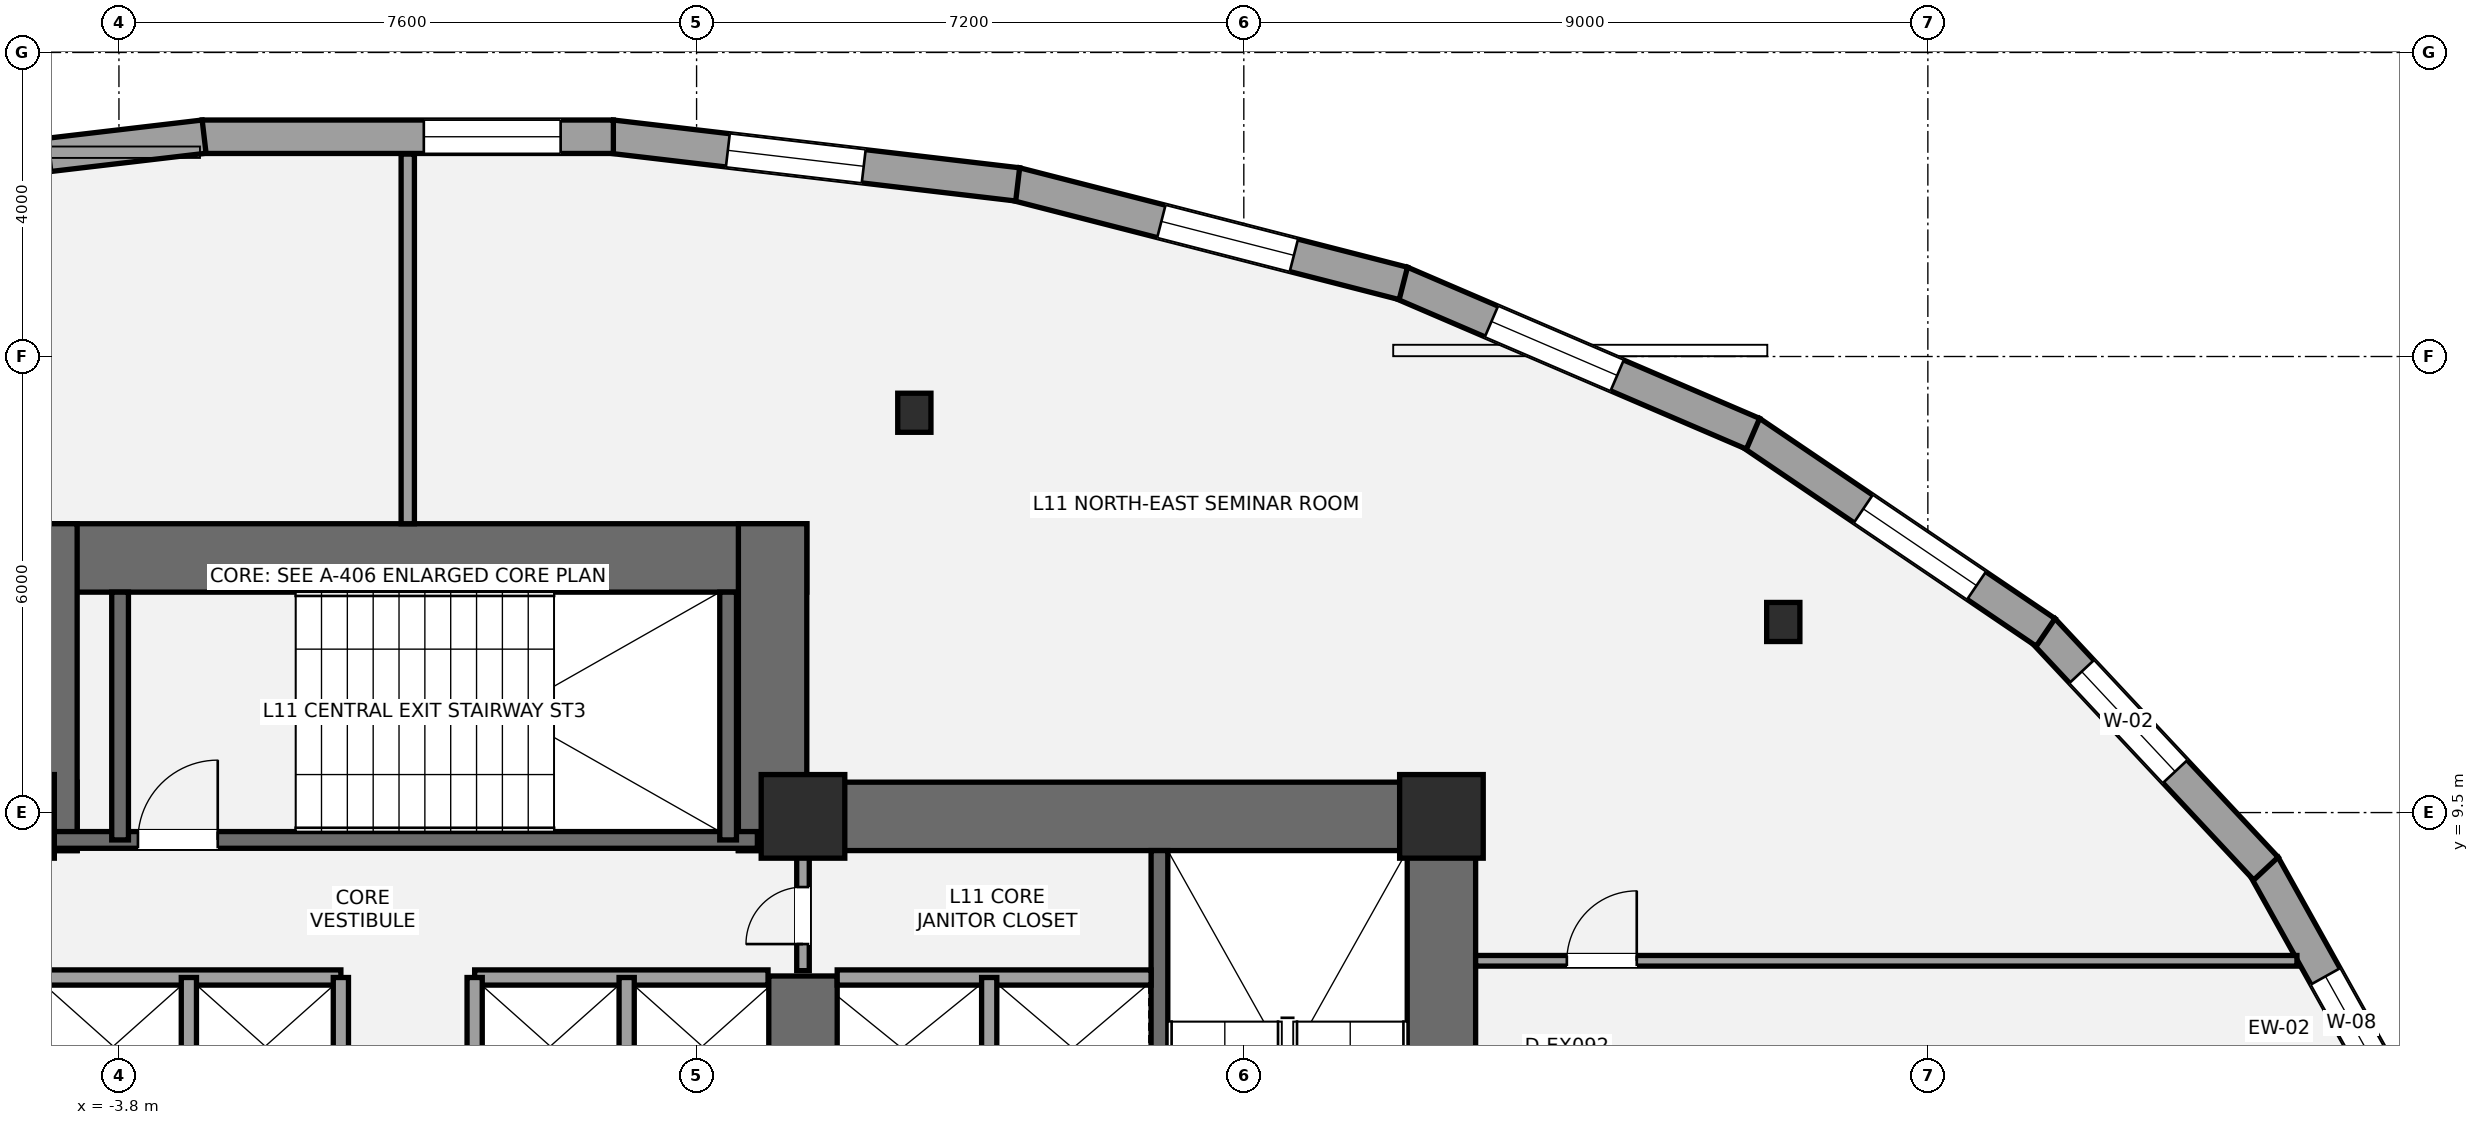
"""IFC4 building model, lengths in metres.
Left out: names, types, materials, properties, quantities, classifications, styles, units other than length and angle.
Written with IfcOpenShell. Run it as: python <this file> out.ifc"""

import sys

from ifc_helpers import new_model, si_unit, direction, frame, frame_2d, origin, origin_2d, place, context, subcontext, project, spatial, rectangle, i_section, extrude, element, fill, save


model = new_model("IFC4")
c1 = context("Model", 3, precision=1e-05, world=origin(), true_north=direction((0.0, 1.0)))
c2 = subcontext(c1, "Body", "Model", "MODEL_VIEW")
j1 = project(units=[si_unit("LENGTHUNIT", "METRE"), si_unit("PLANEANGLEUNIT", "RADIAN")], contexts=[c1])
p1 = place(None, origin())
s1 = spatial("IfcSite", under=j1, at=p1, CompositionType="ELEMENT")
p2 = place(p1, origin())
s2 = spatial("IfcBuilding", under=s1, at=p2, CompositionType="ELEMENT")
p3 = place(p2, frame((0.0, 0.0, 45.0)))
s3 = spatial("IfcBuildingStorey", under=s2, at=p3, CompositionType="ELEMENT", Elevation=45.0)
p4 = place(p3, frame((-14.05, 9.45, 0.0), z_axis=(0.0, 0.0, 1.0), x_axis=(1.0, 0.0, 0.0)))
e1 = element("IfcWall", 1, at=p4, inside=s3, PredefinedType="SHEAR", context=c2, shape_type="SweptSolid", body=[
    extrude(rectangle(XDim=9.7, YDim=0.9, at=frame_2d((4.85, 0.0))), origin(), (0.0, 0.0, 1.0), 3.6),
])
p5 = place(p3, frame((13.6, 0.95, 0.0), z_axis=(0.0, 0.0, 1.0), x_axis=(0.0, 1.0, 0.0)))
e2 = element("IfcWall", 2, at=p5, inside=s3, PredefinedType="SHEAR", context=c2, shape_type="SweptSolid", body=[
    extrude(rectangle(XDim=8.95, YDim=0.9, at=frame_2d((4.475, 0.0))), origin(), (0.0, 0.0, 1.0), 3.6),
])
p6 = place(p3, frame((4.35, 9.45, 0.0), z_axis=(0.0, 0.0, 1.0), x_axis=(1.0, 0.0, 0.0)))
e3 = element("IfcWall", 3, at=p6, inside=s3, PredefinedType="SHEAR", context=c2, shape_type="SweptSolid", body=[
    extrude(rectangle(XDim=9.7, YDim=0.9, at=frame_2d((4.85, 0.0))), origin(), (0.0, 0.0, 1.0), 3.6),
])
p7 = place(p3, frame((5.2, 5.35, 0.0), z_axis=(0.0, 0.0, 1.0), x_axis=(0.0, 1.0, 0.0)))
e4 = element("IfcWall", 4, at=p7, inside=s3, PredefinedType="SHEAR", context=c2, shape_type="SweptSolid", body=[
    extrude(rectangle(XDim=2.0, YDim=0.9, at=frame_2d((1.0, 0.0))), origin(), (0.0, 0.0, 1.0), 3.6),
])
p8 = place(p3, frame((9.89, 1.85, 0.0), z_axis=(0.0, 0.0, 1.0), x_axis=(0.0, 1.0, 0.0)))
e5 = element("IfcWall", 5, at=p8, inside=s3, PredefinedType="SHEAR", context=c2, shape_type="SweptSolid", body=[
    extrude(rectangle(XDim=7.15, YDim=0.22, at=frame_2d((3.575, 0.0))), origin(), (0.0, 0.0, 1.0), 3.6),
])
p9 = place(p3, frame((-5.25, 12.85, 0.0), z_axis=(0.0, 0.0, 1.0), x_axis=(1.0, 0.0, 0.0)))
e6 = element("IfcWall", 6, at=p9, inside=s3, PredefinedType="SHEAR", context=c2, shape_type="SweptSolid", body=[
    extrude(rectangle(XDim=10.5, YDim=0.9, at=frame_2d((5.25, 0.0))), origin(), (0.0, 0.0, 1.0), 3.6),
])
for number, where, z_axis, x_axis in (
    (7, (-4.8, 9.0, 0.0), (0.0, 0.0, 1.0), (0.0, 1.0, 0.0)),
    (8, (4.8, 9.0, 0.0), (0.0, 0.0, 1.0), (0.0, 1.0, 0.0)),
):
    element("IfcWall", number, at=place(p3, frame(where, z_axis=z_axis, x_axis=x_axis)), inside=s3, PredefinedType="SHEAR", context=c2, shape_type="SweptSolid", body=[
        extrude(rectangle(XDim=4.3, YDim=0.9, at=frame_2d((2.15, 0.0))), origin(), (0.0, 0.0, 1.0), 3.6),
    ])
p10 = place(p3, frame((-4.7, 9.14, 0.0), z_axis=(0.0, 0.0, 1.0), x_axis=(1.0, 0.0, 0.0)))
e9 = element("IfcWall", 9, at=p10, inside=s3, PredefinedType="SHEAR", context=c2, shape_type="SweptSolid", body=[
    extrude(rectangle(XDim=9.3, YDim=0.22, at=frame_2d((4.65, 0.0))), origin(), (0.0, 0.0, 1.0), 3.6),
])
p11 = place(p10, frame((1.15, 0.0, 0.0)))
e10 = element("IfcOpeningElement", 10, at=p11, cuts=e9, PredefinedType="OPENING", context=c2, shape_type="SweptSolid", body=[
    extrude(rectangle(XDim=1.05, YDim=2.15, at=frame_2d((0.525, 1.075))), frame((0.0, 0.12, 0.0), z_axis=(0.0, -1.0, 0.0), x_axis=(1.0, 0.0, 0.0)), (0.0, 0.0, 1.0), 0.24),
])
for number, where, z_axis, x_axis in (
    (11, (-3.785, 9.14, 0.0), (0.0, 0.0, 1.0), (0.0, 1.0, 0.0)),
    (12, (4.215, 9.14, 0.0), (0.0, 0.0, 1.0), (0.0, 1.0, 0.0)),
):
    element("IfcWall", number, at=place(p3, frame(where, z_axis=z_axis, x_axis=x_axis)), inside=s3, PredefinedType="SHEAR", context=c2, shape_type="SweptSolid", body=[
        extrude(rectangle(XDim=3.26, YDim=0.22, at=frame_2d((1.63, 0.0))), origin(), (0.0, 0.0, 1.0), 3.6),
    ])
for number, where, z_axis, x_axis in (
    (13, (-5.2, 9.45, 0.0), (0.0, 0.0, 1.0), (1.0, 0.0, 0.0)),
    (14, (5.2, 9.45, 0.0), (0.0, 0.0, 1.0), (1.0, 0.0, 0.0)),
    (15, (13.6, 9.45, 0.0), (0.0, 0.0, 1.0), (1.0, 0.0, 0.0)),
):
    element("IfcColumn", number, at=place(p3, frame(where, z_axis=z_axis, x_axis=x_axis)), inside=s3, PredefinedType="COLUMN", context=c2, shape_type="SweptSolid", body=[
        extrude(rectangle(XDim=1.1, YDim=1.1, at=origin_2d()), origin(), (0.0, 0.0, 1.0), 3.6),
    ])
for number, where, z_axis, x_axis in (
    (16, (18.098, 12.007, 0.0), (0.0, 0.0, 1.0), (1.0, 0.0, 0.0)),
    (17, (6.665, 14.76, 0.0), (0.0, 0.0, 1.0), (1.0, 0.0, 0.0)),
):
    element("IfcColumn", number, at=place(p3, frame(where, z_axis=z_axis, x_axis=x_axis)), inside=s3, PredefinedType="COLUMN", context=c2, shape_type="SweptSolid", body=[
        extrude(i_section(OverallWidth=0.437, OverallDepth=0.514, WebThickness=0.061, FlangeThickness=0.097, at=origin_2d()), origin(), (0.0, 0.0, 1.0), 3.6),
    ])
p12 = place(p3, frame((24.416, 8.806, 0.0), z_axis=(0.0, 0.0, 1.0), x_axis=(0.487369438963, -0.873195871477, 0.0)))
e18 = element("IfcWall", 18, at=p12, inside=s3, PredefinedType="STANDARD", context=c2, shape_type="SweptSolid", body=[
    extrude(rectangle(XDim=3.96, YDim=0.44, at=frame_2d((1.98, 0.0))), origin(), (0.0, 0.0, 1.0), 2.529),
])
p13 = place(p12, frame((1.673, 0.0, 0.58)))
e19 = element("IfcOpeningElement", 19, at=p13, cuts=e18, PredefinedType="OPENING", context=c2, shape_type="SweptSolid", body=[
    extrude(rectangle(XDim=1.4, YDim=1.55, at=frame_2d((0.7, 0.775))), frame((0.0, 0.23, 0.0), z_axis=(0.0, -1.0, 0.0), x_axis=(1.0, 0.0, 0.0)), (0.0, 0.0, 1.0), 0.46),
])
p14 = place(p3, frame((21.512, 11.902, 0.0), z_axis=(0.0, 0.0, 1.0), x_axis=(0.68299392258, -0.730424056093, 0.0)))
e20 = element("IfcWall", 20, at=p14, inside=s3, PredefinedType="STANDARD", context=c2, shape_type="SweptSolid", body=[
    extrude(rectangle(XDim=4.298, YDim=0.44, at=frame_2d((2.149, 0.0))), origin(), (0.0, 0.0, 1.0), 2.529),
])
p15 = place(p14, frame((0.75, 0.0, 0.65)))
e21 = element("IfcOpeningElement", 21, at=p15, cuts=e20, PredefinedType="OPENING", context=c2, shape_type="SweptSolid", body=[
    extrude(rectangle(XDim=1.8, YDim=1.7, at=frame_2d((0.9, 0.85))), frame((0.0, 0.23, 0.0), z_axis=(0.0, -1.0, 0.0), x_axis=(1.0, 0.0, 0.0)), (0.0, 0.0, 1.0), 0.46),
])
p16 = place(p3, frame((17.663, 14.504, 0.0), z_axis=(0.0, 0.0, 1.0), x_axis=(0.827825981515, -0.560984976919, 0.0)))
e22 = element("IfcWall", 22, at=p16, inside=s3, PredefinedType="STANDARD", context=c2, shape_type="SweptSolid", body=[
    extrude(rectangle(XDim=4.695, YDim=0.44, at=frame_2d((2.347, 0.0))), origin(), (0.0, 0.0, 1.0), 2.529),
])
p17 = place(p16, frame((1.796, 0.0, 0.65)))
e23 = element("IfcOpeningElement", 23, at=p17, cuts=e22, PredefinedType="OPENING", context=c2, shape_type="SweptSolid", body=[
    extrude(rectangle(XDim=1.8, YDim=1.7, at=frame_2d((0.9, 0.85))), frame((0.0, 0.23, 0.0), z_axis=(0.0, -1.0, 0.0), x_axis=(1.0, 0.0, 0.0)), (0.0, 0.0, 1.0), 0.46),
])
p18 = place(p3, frame((13.067, 16.473, 0.0), z_axis=(0.0, 0.0, 1.0), x_axis=(0.918881850071, -0.394532819433, 0.0)))
e24 = element("IfcWall", 24, at=p18, inside=s3, PredefinedType="STANDARD", context=c2, shape_type="SweptSolid", body=[
    extrude(rectangle(XDim=5.042, YDim=0.44, at=frame_2d((2.521, 0.0))), origin(), (0.0, 0.0, 1.0), 2.529),
])
p19 = place(p18, frame((1.297, 0.0, 0.65)))
e25 = element("IfcOpeningElement", 25, at=p19, cuts=e24, PredefinedType="OPENING", context=c2, shape_type="SweptSolid", body=[
    extrude(rectangle(XDim=1.8, YDim=1.7, at=frame_2d((0.9, 0.85))), frame((0.0, 0.23, 0.0), z_axis=(0.0, -1.0, 0.0), x_axis=(1.0, 0.0, 0.0)), (0.0, 0.0, 1.0), 0.46),
])
p20 = place(p3, frame((7.996, 17.77, 0.0), z_axis=(0.0, 0.0, 1.0), x_axis=(0.968705592422, -0.248212560542, 0.0)))
e26 = element("IfcWall", 26, at=p20, inside=s3, PredefinedType="STANDARD", context=c2, shape_type="SweptSolid", body=[
    extrude(rectangle(XDim=5.268, YDim=0.44, at=frame_2d((2.634, 0.0))), origin(), (0.0, 0.0, 1.0), 2.529),
])
p21 = place(p20, frame((1.981, 0.0, 0.65)))
e27 = element("IfcOpeningElement", 27, at=p21, cuts=e26, PredefinedType="OPENING", context=c2, shape_type="SweptSolid", body=[
    extrude(rectangle(XDim=1.8, YDim=1.7, at=frame_2d((0.9, 0.85))), frame((0.0, 0.23, 0.0), z_axis=(0.0, -1.0, 0.0), x_axis=(1.0, 0.0, 0.0)), (0.0, 0.0, 1.0), 0.46),
])
p22 = place(p3, frame((2.679, 18.393, 0.0), z_axis=(0.0, 0.0, 1.0), x_axis=(0.993159890371, -0.116762289112, 0.0)))
e28 = element("IfcWall", 28, at=p22, inside=s3, PredefinedType="STANDARD", context=c2, shape_type="SweptSolid", body=[
    extrude(rectangle(XDim=5.382, YDim=0.44, at=frame_2d((2.691, 0.0))), origin(), (0.0, 0.0, 1.0), 2.529),
])
p23 = place(p22, frame((1.542, 0.0, 0.65)))
e29 = element("IfcOpeningElement", 29, at=p23, cuts=e28, PredefinedType="OPENING", context=c2, shape_type="SweptSolid", body=[
    extrude(rectangle(XDim=1.8, YDim=1.7, at=frame_2d((0.9, 0.85))), frame((0.0, 0.23, 0.0), z_axis=(0.0, -1.0, 0.0), x_axis=(1.0, 0.0, 0.0)), (0.0, 0.0, 1.0), 0.46),
])
p24 = place(p3, frame((-2.705, 18.391, 0.0), z_axis=(0.0, 0.0, 1.0), x_axis=(1.0, 0.0, 0.0)))
e30 = element("IfcWall", 30, at=p24, inside=s3, PredefinedType="STANDARD", context=c2, shape_type="SweptSolid", body=[
    extrude(rectangle(XDim=5.41, YDim=0.44, at=frame_2d((2.705, 0.0))), origin(), (0.0, 0.0, 1.0), 2.529),
])
p25 = place(p24, frame((2.917, 0.0, 0.65)))
e31 = element("IfcOpeningElement", 31, at=p25, cuts=e30, PredefinedType="OPENING", context=c2, shape_type="SweptSolid", body=[
    extrude(rectangle(XDim=1.8, YDim=1.7, at=frame_2d((0.9, 0.85))), frame((0.0, 0.23, 0.0), z_axis=(0.0, -1.0, 0.0), x_axis=(1.0, 0.0, 0.0)), (0.0, 0.0, 1.0), 0.46),
])
p26 = place(p3, frame((-8.025, 17.764, 0.0), z_axis=(0.0, 0.0, 1.0), x_axis=(0.993159890371, 0.116762289112, 0.0)))
e32 = element("IfcWall", 32, at=p26, inside=s3, PredefinedType="STANDARD", context=c2, shape_type="SweptSolid", body=[
    extrude(rectangle(XDim=5.382, YDim=0.44, at=frame_2d((2.691, 0.0))), origin(), (0.0, 0.0, 1.0), 2.529),
])
p27 = place(p26, frame((1.542, 0.0, 0.65)))
e33 = element("IfcOpeningElement", 33, at=p27, cuts=e32, PredefinedType="OPENING", context=c2, shape_type="SweptSolid", body=[
    extrude(rectangle(XDim=1.8, YDim=1.7, at=frame_2d((0.9, 0.85))), frame((0.0, 0.23, 0.0), z_axis=(0.0, -1.0, 0.0), x_axis=(1.0, 0.0, 0.0)), (0.0, 0.0, 1.0), 0.46),
])
p28 = place(p3, frame((5.65, 7.33, 0.0), z_axis=(0.0, 0.0, 1.0), x_axis=(1.0, 0.0, 0.0)))
e34 = element("IfcWall", 34, at=p28, inside=s3, PredefinedType="SOLIDWALL", context=c2, shape_type="SweptSolid", body=[
    extrude(rectangle(XDim=4.13, YDim=0.2, at=frame_2d((2.065, 0.0))), origin(), (0.0, 0.0, 1.0), 3.4),
])
p29 = place(p3, frame((7.65, 5.47, 0.0), z_axis=(0.0, 0.0, 1.0), x_axis=(0.0, 1.0, 0.0)))
e35 = element("IfcWall", 35, at=p29, inside=s3, PredefinedType="SOLIDWALL", context=c2, shape_type="SweptSolid", body=[
    extrude(rectangle(XDim=1.86, YDim=0.2, at=frame_2d((0.93, 0.0))), origin(), (0.0, 0.0, 1.0), 3.4),
])
for number, where, z_axis, x_axis in (
    (36, (-4.74, 7.33, 0.0), (0.0, 0.0, 1.0), (1.0, 0.0, 0.0)),
    (37, (0.88, 7.33, 0.0), (0.0, 0.0, 1.0), (1.0, 0.0, 0.0)),
):
    element("IfcWall", number, at=place(p3, frame(where, z_axis=z_axis, x_axis=x_axis)), inside=s3, PredefinedType="SOLIDWALL", context=c2, shape_type="SweptSolid", body=[
        extrude(rectangle(XDim=3.86, YDim=0.2, at=frame_2d((1.93, 0.0))), origin(), (0.0, 0.0, 1.0), 3.4),
    ])
for number, where, z_axis, x_axis in (
    (38, (-2.88, 5.52, 0.0), (0.0, 0.0, 1.0), (0.0, 1.0, 0.0)),
    (39, (2.88, 5.52, 0.0), (0.0, 0.0, 1.0), (0.0, 1.0, 0.0)),
    (40, (-0.88, 5.52, 0.0), (0.0, 0.0, 1.0), (0.0, 1.0, 0.0)),
    (41, (0.88, 5.52, 0.0), (0.0, 0.0, 1.0), (0.0, 1.0, 0.0)),
):
    element("IfcWall", number, at=place(p3, frame(where, z_axis=z_axis, x_axis=x_axis)), inside=s3, PredefinedType="SOLIDWALL", context=c2, shape_type="SweptSolid", body=[
        extrude(rectangle(XDim=1.81, YDim=0.2, at=frame_2d((0.905, 0.0))), origin(), (0.0, 0.0, 1.0), 3.4),
    ])
p30 = place(p3, frame((5.2, 7.42, 0.0), z_axis=(0.0, 0.0, 1.0), x_axis=(0.0, 1.0, 0.0)))
e42 = element("IfcWall", 42, at=p30, inside=s3, PredefinedType="PARTITIONING", context=c2, shape_type="SweptSolid", body=[
    extrude(rectangle(XDim=1.58, YDim=0.165, at=frame_2d((0.79, 0.0))), origin(), (0.0, 0.0, 1.0), 3.4),
])
p31 = place(p30, frame((0.35, 0.0, 0.0)))
e43 = element("IfcOpeningElement", 43, at=p31, cuts=e42, PredefinedType="OPENING", context=c2, shape_type="SweptSolid", body=[
    extrude(rectangle(XDim=0.75, YDim=2.1, at=frame_2d((0.375, 1.05))), frame((0.0, 0.093, 0.0), z_axis=(0.0, -1.0, 0.0), x_axis=(1.0, 0.0, 0.0)), (0.0, 0.0, 1.0), 0.185),
])
p32 = place(p3, frame((14.05, 7.55, 0.0), z_axis=(0.0, 0.0, 1.0), x_axis=(1.0, 0.0, 0.0)))
e44 = element("IfcWall", 44, at=p32, inside=s3, PredefinedType="PARTITIONING", context=c2, shape_type="SweptSolid", body=[
    extrude(rectangle(XDim=10.806, YDim=0.14, at=frame_2d((5.403, 0.0))), origin(), (0.0, 0.0, 1.0), 2.853),
])
p33 = place(p32, frame((1.2, 0.0, 0.0)))
e45 = element("IfcOpeningElement", 45, at=p33, cuts=e44, PredefinedType="OPENING", context=c2, shape_type="SweptSolid", body=[
    extrude(rectangle(XDim=0.92, YDim=2.15, at=frame_2d((0.46, 1.075))), frame((0.0, 0.08, 0.0), z_axis=(0.0, -1.0, 0.0), x_axis=(1.0, 0.0, 0.0)), (0.0, 0.0, 1.0), 0.16),
])
p34 = place(p3, frame((0.0, 13.3, 0.0), z_axis=(0.0, 0.0, 1.0), x_axis=(0.0, 1.0, 0.0)))
e46 = element("IfcWall", 46, at=p34, inside=s3, PredefinedType="PARTITIONING", context=c2, shape_type="SweptSolid", body=[
    extrude(rectangle(XDim=4.863, YDim=0.175, at=frame_2d((2.432, 0.0))), origin(), (0.0, 0.0, 1.0), 3.4),
])
p35 = place(p13, origin())
e47 = element("IfcWindow", 47, at=p35, inside=s3, PartitioningType="SINGLE_PANEL", PredefinedType="WINDOW", context=c2, shape_type="SweptSolid", body=[
    extrude(rectangle(XDim=1.4, YDim=1.55, at=frame_2d((0.7, 0.775))), frame((0.0, -0.01, 0.0), z_axis=(0.0, -1.0, 0.0), x_axis=(1.0, 0.0, 0.0)), (0.0, 0.0, 1.0), 0.06),
])
fill(e19, e47)
p36 = place(p15, origin())
e48 = element("IfcWindow", 48, at=p36, inside=s3, PartitioningType="SINGLE_PANEL", PredefinedType="WINDOW", context=c2, shape_type="SweptSolid", body=[
    extrude(rectangle(XDim=1.8, YDim=1.7, at=frame_2d((0.9, 0.85))), frame((0.0, -0.01, 0.0), z_axis=(0.0, -1.0, 0.0), x_axis=(1.0, 0.0, 0.0)), (0.0, 0.0, 1.0), 0.06),
])
fill(e21, e48)
p37 = place(p17, origin())
e49 = element("IfcWindow", 49, at=p37, inside=s3, PartitioningType="SINGLE_PANEL", PredefinedType="WINDOW", context=c2, shape_type="SweptSolid", body=[
    extrude(rectangle(XDim=1.8, YDim=1.7, at=frame_2d((0.9, 0.85))), frame((0.0, -0.01, 0.0), z_axis=(0.0, -1.0, 0.0), x_axis=(1.0, 0.0, 0.0)), (0.0, 0.0, 1.0), 0.06),
])
fill(e23, e49)
p38 = place(p19, origin())
e50 = element("IfcWindow", 50, at=p38, inside=s3, PartitioningType="SINGLE_PANEL", PredefinedType="WINDOW", context=c2, shape_type="SweptSolid", body=[
    extrude(rectangle(XDim=1.8, YDim=1.7, at=frame_2d((0.9, 0.85))), frame((0.0, -0.01, 0.0), z_axis=(0.0, -1.0, 0.0), x_axis=(1.0, 0.0, 0.0)), (0.0, 0.0, 1.0), 0.06),
])
fill(e25, e50)
p39 = place(p21, origin())
e51 = element("IfcWindow", 51, at=p39, inside=s3, PartitioningType="SINGLE_PANEL", PredefinedType="WINDOW", context=c2, shape_type="SweptSolid", body=[
    extrude(rectangle(XDim=1.8, YDim=1.7, at=frame_2d((0.9, 0.85))), frame((0.0, -0.01, 0.0), z_axis=(0.0, -1.0, 0.0), x_axis=(1.0, 0.0, 0.0)), (0.0, 0.0, 1.0), 0.06),
])
fill(e27, e51)
p40 = place(p23, origin())
e52 = element("IfcWindow", 52, at=p40, inside=s3, PartitioningType="SINGLE_PANEL", PredefinedType="WINDOW", context=c2, shape_type="SweptSolid", body=[
    extrude(rectangle(XDim=1.8, YDim=1.7, at=frame_2d((0.9, 0.85))), frame((0.0, -0.01, 0.0), z_axis=(0.0, -1.0, 0.0), x_axis=(1.0, 0.0, 0.0)), (0.0, 0.0, 1.0), 0.06),
])
fill(e29, e52)
p41 = place(p25, origin())
e53 = element("IfcWindow", 53, at=p41, inside=s3, PartitioningType="SINGLE_PANEL", PredefinedType="WINDOW", context=c2, shape_type="SweptSolid", body=[
    extrude(rectangle(XDim=1.8, YDim=1.7, at=frame_2d((0.9, 0.85))), frame((0.0, -0.01, 0.0), z_axis=(0.0, -1.0, 0.0), x_axis=(1.0, 0.0, 0.0)), (0.0, 0.0, 1.0), 0.06),
])
fill(e31, e53)
p42 = place(p11, origin())
e54 = element("IfcDoor", 54, at=p42, inside=s3, OperationType="SINGLE_SWING_RIGHT", PredefinedType="DOOR", context=c2, shape_type="SweptSolid", body=[
    extrude(rectangle(XDim=1.05, YDim=2.15, at=frame_2d((0.525, 1.075))), frame((0.0, 0.025, 0.0), z_axis=(0.0, -1.0, 0.0), x_axis=(1.0, 0.0, 0.0)), (0.0, 0.0, 1.0), 0.05),
])
fill(e10, e54)
p43 = place(p31, origin())
e55 = element("IfcDoor", 55, at=p43, inside=s3, OperationType="SINGLE_SWING_LEFT", PredefinedType="DOOR", context=c2, shape_type="SweptSolid", body=[
    extrude(rectangle(XDim=0.75, YDim=2.1, at=frame_2d((0.375, 1.05))), frame((0.0, 0.025, 0.0), z_axis=(0.0, -1.0, 0.0), x_axis=(1.0, 0.0, 0.0)), (0.0, 0.0, 1.0), 0.05),
])
fill(e43, e55)
p44 = place(p33, origin())
e56 = element("IfcDoor", 56, at=p44, inside=s3, OperationType="SINGLE_SWING_RIGHT", PredefinedType="DOOR", context=c2, shape_type="SweptSolid", body=[
    extrude(rectangle(XDim=0.92, YDim=2.15, at=frame_2d((0.46, 1.075))), frame((0.0, 0.025, 0.0), z_axis=(0.0, -1.0, 0.0), x_axis=(1.0, 0.0, 0.0)), (0.0, 0.0, 1.0), 0.05),
])
fill(e45, e56)
save(model, sys.argv[1])
